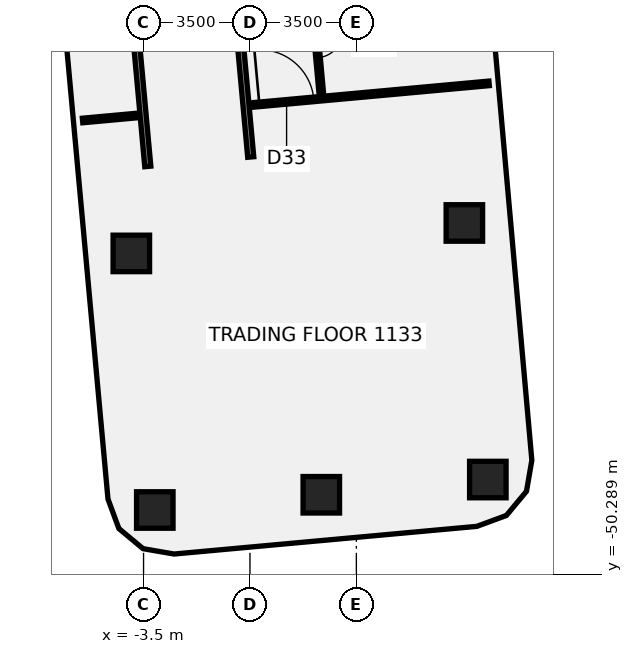
"""IFC4 building model, lengths in metres.
Left out: names, types, materials, properties, quantities, classifications, styles, units other than length and angle.
Written with IfcOpenShell. Run it as: python <this file> out.ifc"""

import sys

from ifc_helpers import new_model, si_unit, direction, frame, frame_2d, origin, origin_2d, place, context, subcontext, project, spatial, polyline, rectangle, outline, extrude, element, fill, save


model = new_model("IFC4")
c1 = context("Model", 3, precision=1e-05, world=origin(), true_north=direction((0.0, 1.0)))
c2 = subcontext(c1, "Body", "Model", "MODEL_VIEW")
j1 = project(units=[si_unit("LENGTHUNIT", "METRE"), si_unit("PLANEANGLEUNIT", "RADIAN")], contexts=[c1])
p1 = place(None, origin())
s1 = spatial("IfcSite", under=j1, at=p1, CompositionType="ELEMENT")
p2 = place(p1, origin())
s2 = spatial("IfcBuilding", under=s1, at=p2, CompositionType="ELEMENT")
p3 = place(p2, frame((0.0, 0.0, 52.75)))
s3 = spatial("IfcBuildingStorey", under=s2, at=p3, CompositionType="ELEMENT", Elevation=52.75)
for number, where, z_axis, x_axis in (
    (1, (7.052, -38.727, -0.138), (0.081, 0.035, 0.996), (-0.992, -0.09, 0.084)),
    (2, (-3.902, -39.729, -0.138), (0.086, -0.018, 0.996), (-0.09, 0.996, 0.026)),
):
    element("IfcColumn", number, at=place(p3, frame(where, z_axis=z_axis, x_axis=x_axis)), inside=s3, PredefinedType="COLUMN", context=c2, shape_type="SweptSolid", body=[
        extrude(rectangle(XDim=1.2, YDim=1.2, at=origin_2d()), origin(), (0.0, 0.0, 1.0), 3.761),
    ])
p4 = place(p3, frame((-3.13, -48.168, -0.139), z_axis=(0.125393496079, -0.004847686704, 0.992095242945), x_axis=(-0.090111620941, 0.995799007524, 0.016255226412)))
e3 = element("IfcColumn", 3, at=p4, inside=s3, PredefinedType="COLUMN", context=c2, shape_type="SweptSolid", body=[
    extrude(rectangle(XDim=1.2, YDim=1.2, at=origin_2d()), origin(), (0.0, 0.0, 1.0), 3.777),
])
p5 = place(p3, frame((2.347, -47.667, -0.138), z_axis=(0.122700997367, 0.021527624933, 0.992210172599), x_axis=(-0.988208437257, -0.08961444308, 0.124150457614)))
e4 = element("IfcColumn", 4, at=p5, inside=s3, PredefinedType="COLUMN", context=c2, shape_type="SweptSolid", body=[
    extrude(rectangle(XDim=1.2, YDim=1.2, at=origin_2d()), origin(), (0.0, 0.0, 1.0), 3.776),
])
p6 = place(p3, frame((7.824, -47.166, -0.138), z_axis=(0.120050205709, 0.047942547167, 0.991609530148), x_axis=(-0.988374035814, -0.088097294404, 0.123917843943)))
e5 = element("IfcColumn", 5, at=p6, inside=s3, PredefinedType="COLUMN", context=c2, shape_type="SweptSolid", body=[
    extrude(rectangle(XDim=1.2, YDim=1.2, at=origin_2d()), origin(), (0.0, 0.0, 1.0), 3.779),
])
p7 = place(p3, frame((1.328, -23.35, 0.0), z_axis=(0.0, 0.0, 1.0), x_axis=(0.091258697725, -0.995827218994, 0.0)))
e6 = element("IfcWall", 6, at=p7, inside=s3, PredefinedType="PARTITIONING", context=c2, shape_type="SweptSolid", body=[
    extrude(rectangle(XDim=11.266, YDim=0.15, at=frame_2d((5.633, 0.0))), origin(), (0.0, 0.0, 1.0), 3.01),
])
p8 = place(p7, frame((0.835, 0.0, 0.0)))
e7 = element("IfcOpeningElement", 7, at=p8, cuts=e6, PredefinedType="OPENING", context=c2, shape_type="SweptSolid", body=[
    extrude(rectangle(XDim=1.0, YDim=2.1, at=frame_2d((0.5, 1.05))), frame((0.0, 0.085, 0.0), z_axis=(0.0, -1.0, 0.0), x_axis=(1.0, 0.0, 0.0)), (0.0, 0.0, 1.0), 0.17),
])
p9 = place(p7, frame((3.535, 0.0, 0.0)))
e8 = element("IfcOpeningElement", 8, at=p9, cuts=e6, PredefinedType="OPENING", context=c2, shape_type="SweptSolid", body=[
    extrude(rectangle(XDim=0.9, YDim=2.1, at=frame_2d((0.45, 1.05))), frame((0.0, 0.085, 0.0), z_axis=(0.0, -1.0, 0.0), x_axis=(1.0, 0.0, 0.0)), (0.0, 0.0, 1.0), 0.17),
])
p10 = place(p7, frame((9.085, 0.0, 0.0)))
e9 = element("IfcOpeningElement", 9, at=p10, cuts=e6, PredefinedType="OPENING", context=c2, shape_type="SweptSolid", body=[
    extrude(rectangle(XDim=0.9, YDim=2.1, at=frame_2d((0.45, 1.05))), frame((0.0, 0.085, 0.0), z_axis=(0.0, -1.0, 0.0), x_axis=(1.0, 0.0, 0.0)), (0.0, 0.0, 1.0), 0.17),
])
p11 = place(p3, frame((-5.506, -35.357, 0.0), z_axis=(0.0, 0.0, 1.0), x_axis=(0.995850035919, 0.091009372925, 0.0)))
e10 = element("IfcWall", 10, at=p11, inside=s3, PredefinedType="PARTITIONING", context=c2, shape_type="SweptSolid", body=[
    extrude(rectangle(XDim=1.859, YDim=0.15, at=frame_2d((0.93, 0.0))), origin(), (0.0, 0.0, 1.0), 3.01),
])
p12 = place(p3, frame((0.01, -34.853, 0.0), z_axis=(0.0, 0.0, 1.0), x_axis=(0.995857615288, 0.090926399208, 0.0)))
e11 = element("IfcWall", 11, at=p12, inside=s3, PredefinedType="PARTITIONING", context=c2, shape_type="SweptSolid", body=[
    extrude(rectangle(XDim=7.889, YDim=0.15, at=frame_2d((3.944, 0.0))), origin(), (0.0, 0.0, 1.0), 3.01),
])
p13 = place(p12, frame((0.3, 0.0, 0.0)))
e12 = element("IfcOpeningElement", 12, at=p13, cuts=e11, PredefinedType="OPENING", context=c2, shape_type="SweptSolid", body=[
    extrude(rectangle(XDim=1.8, YDim=2.1, at=frame_2d((0.9, 1.05))), frame((0.0, 0.085, 0.0), z_axis=(0.0, -1.0, 0.0), x_axis=(1.0, 0.0, 0.0)), (0.0, 0.0, 1.0), 0.17),
])
p14 = place(p3, frame((-0.584, -29.886, -0.14), z_axis=(0.0, 0.0, 1.0), x_axis=(0.091061412838, -0.995845278691, 0.0)))
e13 = element("IfcWall", 13, at=p14, inside=s3, PredefinedType="SHEAR", context=c2, shape_type="SweptSolid", body=[
    extrude(rectangle(XDim=6.7, YDim=0.2, at=frame_2d((3.35, 0.0))), origin(), (0.0, 0.0, 1.0), 3.15),
])
p15 = place(p14, frame((0.35, 0.0, 0.0)))
e14 = element("IfcOpeningElement", 14, at=p15, cuts=e13, PredefinedType="OPENING", context=c2, shape_type="SweptSolid", body=[
    extrude(rectangle(XDim=1.0, YDim=2.1, at=frame_2d((0.5, 1.05))), frame((0.0, 0.11, 0.0), z_axis=(0.0, -1.0, 0.0), x_axis=(1.0, 0.0, 0.0)), (0.0, 0.0, 1.0), 0.22),
])
p16 = place(p3, frame((-3.97, -30.196, -0.14), z_axis=(0.0, 0.0, 1.0), x_axis=(0.091025275677, -0.99584858246, 0.0)))
e15 = element("IfcWall", 15, at=p16, inside=s3, PredefinedType="SHEAR", context=c2, shape_type="SweptSolid", body=[
    extrude(rectangle(XDim=6.7, YDim=0.2, at=frame_2d((3.35, 0.0))), origin(), (0.0, 0.0, 1.0), 3.15),
])
p17 = place(p3, frame((0.0, 0.0, -0.14)))
e16 = element("IfcWall", 16, at=p17, inside=s3, PredefinedType="SHEAR", context=c2, shape_type="SweptSolid", body=[
    extrude(outline(polyline([(-3.279, -36.659), (-3.261, -36.859), (-0.074, -36.567), (-0.092, -36.368), (-3.279, -36.659)])), origin(), (0.0, 0.0, 1.0), 3.15),
])
p18 = place(p10, origin())
e17 = element("IfcDoor", 17, at=p18, inside=s3, OperationType="SINGLE_SWING_LEFT", PredefinedType="DOOR", context=c2, shape_type="SweptSolid", body=[
    extrude(rectangle(XDim=0.9, YDim=2.1, at=frame_2d((0.45, 1.05))), frame((0.0, 0.025, 0.0), z_axis=(0.0, -1.0, 0.0), x_axis=(1.0, 0.0, 0.0)), (0.0, 0.0, 1.0), 0.05),
])
fill(e9, e17)
p19 = place(p13, frame((1.8, 0.0, 0.0), z_axis=(0.0, 0.0, 1.0), x_axis=(-1.0, 0.0, 0.0)))
e18 = element("IfcDoor", 18, at=p19, inside=s3, OperationType="DOUBLE_DOOR_SINGLE_SWING", PredefinedType="DOOR", context=c2, shape_type="SweptSolid", body=[
    extrude(rectangle(XDim=1.8, YDim=2.1, at=frame_2d((0.9, 1.05))), frame((0.0, 0.025, 0.0), z_axis=(0.0, -1.0, 0.0), x_axis=(1.0, 0.0, 0.0)), (0.0, 0.0, 1.0), 0.05),
])
fill(e12, e18)
save(model, sys.argv[1])
